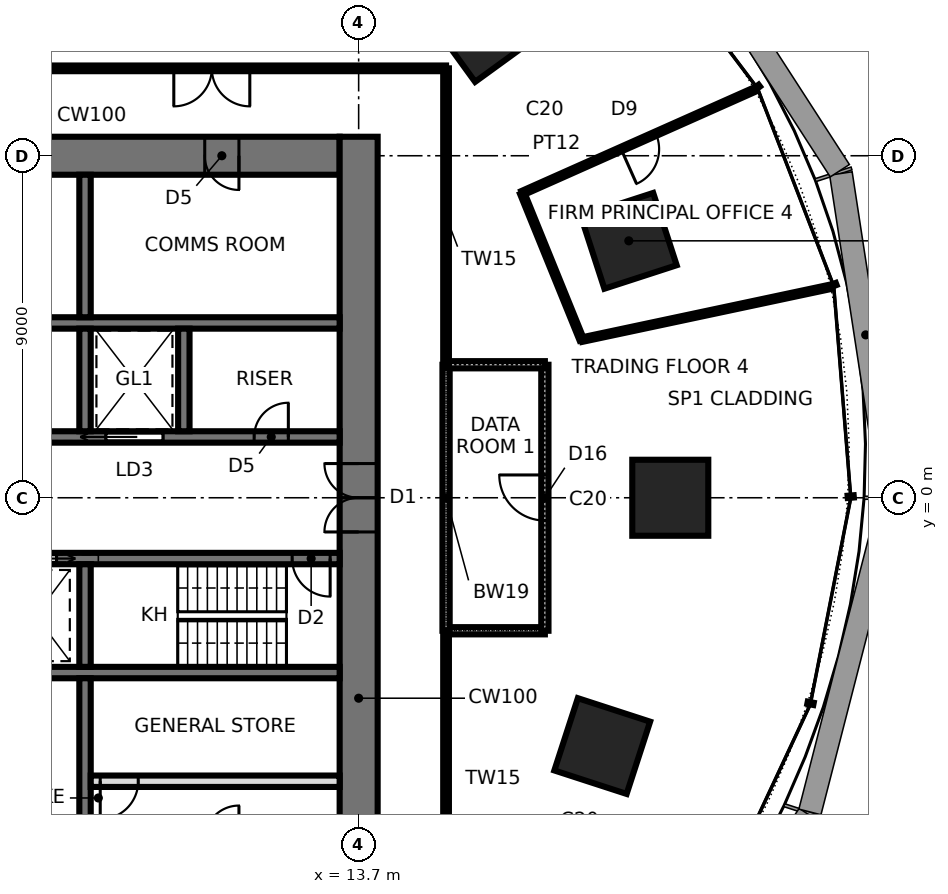
"""IFC4 building model, lengths in metres.
Left out: names, types, materials, properties, quantities, classifications, styles, units other than length and angle.
Written with IfcOpenShell. Run it as: python <this file> out.ifc"""

import sys

from ifc_helpers import new_model, si_unit, direction, frame, frame_2d, origin, origin_2d, place, context, subcontext, project, spatial, rectangle, extrude, element, fill, save


model = new_model("IFC4")
c1 = context("Model", 3, precision=1e-05, world=origin(), true_north=direction((0.0, 1.0)))
c2 = subcontext(c1, "Body", "Model", "MODEL_VIEW")
j1 = project(units=[si_unit("LENGTHUNIT", "METRE"), si_unit("PLANEANGLEUNIT", "RADIAN")], contexts=[c1])
p1 = place(None, origin())
s1 = spatial("IfcSite", under=j1, at=p1, CompositionType="ELEMENT")
p2 = place(p1, origin())
s2 = spatial("IfcBuilding", under=s1, at=p2, CompositionType="ELEMENT")
p3 = place(p2, frame((0.0, 0.0, 65.8)))
s3 = spatial("IfcBuildingStorey", under=s2, at=p3, CompositionType="ELEMENT", Elevation=65.8)
for number, where, z_axis, x_axis in (
    (1, (21.9, 0.0, 0.0), (0.0, 0.0, 1.0), (1.0, 0.0, 0.0)),
    (2, (20.808, 6.761, 0.0), (0.0, 0.0, 1.0), (0.951, 0.309, 0.0)),
    (3, (16.986, 12.341, 0.0), (0.0, 0.0, 1.0), (0.809, 0.588, 0.0)),
    (4, (20.109, -6.534, 0.0), (0.0, 0.0, 1.0), (0.951, -0.309, 0.0)),
):
    element("IfcColumn", number, at=place(p3, frame(where, z_axis=z_axis, x_axis=x_axis)), inside=s3, PredefinedType="COLUMN", context=c2, shape_type="SweptSolid", body=[
        extrude(rectangle(XDim=2.0, YDim=2.0, at=origin_2d()), origin(), (0.0, 0.0, 1.0), 4.2),
    ])
p4 = place(p3, frame((13.2, 9.0, 0.0), z_axis=(0.0, 0.0, 1.0), x_axis=(-1.0, 0.0, 0.0)))
e5 = element("IfcWall", 5, at=p4, inside=s3, PredefinedType="SHEAR", context=c2, shape_type="SweptSolid", body=[
    extrude(rectangle(XDim=26.4, YDim=1.0, at=frame_2d((13.2, 0.0))), origin(), (0.0, 0.0, 1.0), 4.2),
])
p5 = place(p4, frame((2.65, 0.0, 0.0)))
e6 = element("IfcOpeningElement", 6, at=p5, cuts=e5, PredefinedType="OPENING", context=c2, shape_type="SweptSolid", body=[
    extrude(rectangle(XDim=0.9, YDim=2.1, at=frame_2d((0.45, 1.05))), frame((0.0, 0.51, 0.0), z_axis=(0.0, -1.0, 0.0), x_axis=(1.0, 0.0, 0.0)), (0.0, 0.0, 1.0), 1.02),
])
p6 = place(p4, frame((9.5, 0.0, 0.0)))
e7 = element("IfcOpeningElement", 7, at=p6, cuts=e5, PredefinedType="OPENING", context=c2, shape_type="SweptSolid", body=[
    extrude(rectangle(XDim=0.9, YDim=2.1, at=frame_2d((0.45, 1.05))), frame((0.0, 0.51, 0.0), z_axis=(0.0, -1.0, 0.0), x_axis=(1.0, 0.0, 0.0)), (0.0, 0.0, 1.0), 1.02),
])
p7 = place(p4, frame((16.0, 0.0, 0.0)))
e8 = element("IfcOpeningElement", 8, at=p7, cuts=e5, PredefinedType="OPENING", context=c2, shape_type="SweptSolid", body=[
    extrude(rectangle(XDim=0.9, YDim=2.1, at=frame_2d((0.45, 1.05))), frame((0.0, 0.51, 0.0), z_axis=(0.0, -1.0, 0.0), x_axis=(1.0, 0.0, 0.0)), (0.0, 0.0, 1.0), 1.02),
])
p8 = place(p4, frame((21.25, 0.0, 0.0)))
e9 = element("IfcOpeningElement", 9, at=p8, cuts=e5, PredefinedType="OPENING", context=c2, shape_type="SweptSolid", body=[
    extrude(rectangle(XDim=0.9, YDim=2.1, at=frame_2d((0.45, 1.05))), frame((0.0, 0.51, 0.0), z_axis=(0.0, -1.0, 0.0), x_axis=(1.0, 0.0, 0.0)), (0.0, 0.0, 1.0), 1.02),
])
p9 = place(p4, frame((24.8, 0.0, 0.0)))
e10 = element("IfcOpeningElement", 10, at=p9, cuts=e5, PredefinedType="OPENING", context=c2, shape_type="SweptSolid", body=[
    extrude(rectangle(XDim=1.0, YDim=2.1, at=frame_2d((0.5, 1.05))), frame((0.0, 0.51, 0.0), z_axis=(0.0, -1.0, 0.0), x_axis=(1.0, 0.0, 0.0)), (0.0, 0.0, 1.0), 1.02),
])
p10 = place(p3, frame((13.7, -9.5, 0.0), z_axis=(0.0, 0.0, 1.0), x_axis=(0.0, 1.0, 0.0)))
e11 = element("IfcWall", 11, at=p10, inside=s3, PredefinedType="SHEAR", context=c2, shape_type="SweptSolid", body=[
    extrude(rectangle(XDim=19.0, YDim=1.0, at=frame_2d((9.5, 0.0))), origin(), (0.0, 0.0, 1.0), 4.2),
])
p11 = place(p10, frame((8.6, 0.0, 0.0)))
e12 = element("IfcOpeningElement", 12, at=p11, cuts=e11, PredefinedType="OPENING", context=c2, shape_type="SweptSolid", body=[
    extrude(rectangle(XDim=1.8, YDim=2.4, at=frame_2d((0.9, 1.2))), frame((0.0, 0.51, 0.0), z_axis=(0.0, -1.0, 0.0), x_axis=(1.0, 0.0, 0.0)), (0.0, 0.0, 1.0), 1.02),
])
p12 = place(p3, frame((-13.2, 1.6, 0.0), z_axis=(0.0, 0.0, 1.0), x_axis=(1.0, 0.0, 0.0)))
e13 = element("IfcWall", 13, at=p12, inside=s3, PredefinedType="SHEAR", context=c2, shape_type="SweptSolid", body=[
    extrude(rectangle(XDim=26.4, YDim=0.3, at=frame_2d((13.2, 0.0))), origin(), (0.0, 0.0, 1.0), 4.2),
])
p13 = place(p12, frame((0.25, 0.0, 0.0)))
e14 = element("IfcOpeningElement", 14, at=p13, cuts=e13, PredefinedType="OPENING", context=c2, shape_type="SweptSolid", body=[
    extrude(rectangle(XDim=1.0, YDim=2.1, at=frame_2d((0.5, 1.05))), frame((0.0, 0.16, 0.0), z_axis=(0.0, -1.0, 0.0), x_axis=(1.0, 0.0, 0.0)), (0.0, 0.0, 1.0), 0.32),
])
p14 = place(p12, frame((20.25, 0.0, 0.0)))
e15 = element("IfcOpeningElement", 15, at=p14, cuts=e13, PredefinedType="OPENING", context=c2, shape_type="SweptSolid", body=[
    extrude(rectangle(XDim=1.5, YDim=2.4, at=frame_2d((0.75, 1.2))), frame((0.0, 0.16, 0.0), z_axis=(0.0, -1.0, 0.0), x_axis=(1.0, 0.0, 0.0)), (0.0, 0.0, 1.0), 0.32),
])
p15 = place(p12, frame((7.45, 0.0, 0.0)))
e16 = element("IfcOpeningElement", 16, at=p15, cuts=e13, PredefinedType="OPENING", context=c2, shape_type="SweptSolid", body=[
    extrude(rectangle(XDim=1.1, YDim=2.3, at=frame_2d((0.55, 1.15))), frame((0.0, 0.16, 0.0), z_axis=(0.0, -1.0, 0.0), x_axis=(1.0, 0.0, 0.0)), (0.0, 0.0, 1.0), 0.32),
])
p16 = place(p12, frame((10.05, 0.0, 0.0)))
e17 = element("IfcOpeningElement", 17, at=p16, cuts=e13, PredefinedType="OPENING", context=c2, shape_type="SweptSolid", body=[
    extrude(rectangle(XDim=1.1, YDim=2.3, at=frame_2d((0.55, 1.15))), frame((0.0, 0.16, 0.0), z_axis=(0.0, -1.0, 0.0), x_axis=(1.0, 0.0, 0.0)), (0.0, 0.0, 1.0), 0.32),
])
p17 = place(p12, frame((12.65, 0.0, 0.0)))
e18 = element("IfcOpeningElement", 18, at=p17, cuts=e13, PredefinedType="OPENING", context=c2, shape_type="SweptSolid", body=[
    extrude(rectangle(XDim=1.1, YDim=2.3, at=frame_2d((0.55, 1.15))), frame((0.0, 0.16, 0.0), z_axis=(0.0, -1.0, 0.0), x_axis=(1.0, 0.0, 0.0)), (0.0, 0.0, 1.0), 0.32),
])
p18 = place(p12, frame((24.15, 0.0, 0.0)))
e19 = element("IfcOpeningElement", 19, at=p18, cuts=e13, PredefinedType="OPENING", context=c2, shape_type="SweptSolid", body=[
    extrude(rectangle(XDim=0.9, YDim=2.1, at=frame_2d((0.45, 1.05))), frame((0.0, 0.16, 0.0), z_axis=(0.0, -1.0, 0.0), x_axis=(1.0, 0.0, 0.0)), (0.0, 0.0, 1.0), 0.32),
])
p19 = place(p3, frame((-13.2, -1.6, 0.0), z_axis=(0.0, 0.0, 1.0), x_axis=(1.0, 0.0, 0.0)))
e20 = element("IfcWall", 20, at=p19, inside=s3, PredefinedType="SHEAR", context=c2, shape_type="SweptSolid", body=[
    extrude(rectangle(XDim=26.4, YDim=0.3, at=frame_2d((13.2, 0.0))), origin(), (0.0, 0.0, 1.0), 4.2),
])
p20 = place(p19, frame((25.15, 0.0, 0.0)))
e21 = element("IfcOpeningElement", 21, at=p20, cuts=e20, PredefinedType="OPENING", context=c2, shape_type="SweptSolid", body=[
    extrude(rectangle(XDim=1.0, YDim=2.1, at=frame_2d((0.5, 1.05))), frame((0.0, 0.16, 0.0), z_axis=(0.0, -1.0, 0.0), x_axis=(1.0, 0.0, 0.0)), (0.0, 0.0, 1.0), 0.32),
])
p21 = place(p19, frame((15.25, 0.0, 0.0)))
e22 = element("IfcOpeningElement", 22, at=p21, cuts=e20, PredefinedType="OPENING", context=c2, shape_type="SweptSolid", body=[
    extrude(rectangle(XDim=1.1, YDim=2.3, at=frame_2d((0.55, 1.15))), frame((0.0, 0.16, 0.0), z_axis=(0.0, -1.0, 0.0), x_axis=(1.0, 0.0, 0.0)), (0.0, 0.0, 1.0), 0.32),
])
p22 = place(p19, frame((17.85, 0.0, 0.0)))
e23 = element("IfcOpeningElement", 23, at=p22, cuts=e20, PredefinedType="OPENING", context=c2, shape_type="SweptSolid", body=[
    extrude(rectangle(XDim=1.1, YDim=2.3, at=frame_2d((0.55, 1.15))), frame((0.0, 0.16, 0.0), z_axis=(0.0, -1.0, 0.0), x_axis=(1.0, 0.0, 0.0)), (0.0, 0.0, 1.0), 0.32),
])
p23 = place(p19, frame((5.55, 0.0, 0.0)))
e24 = element("IfcOpeningElement", 24, at=p23, cuts=e20, PredefinedType="OPENING", context=c2, shape_type="SweptSolid", body=[
    extrude(rectangle(XDim=0.9, YDim=2.1, at=frame_2d((0.45, 1.05))), frame((0.0, 0.16, 0.0), z_axis=(0.0, -1.0, 0.0), x_axis=(1.0, 0.0, 0.0)), (0.0, 0.0, 1.0), 0.32),
])
for number, where, z_axis, x_axis in (
    (25, (-13.2, 4.6, 0.0), (0.0, 0.0, 1.0), (1.0, 0.0, 0.0)),
    (26, (-13.2, -4.6, 0.0), (0.0, 0.0, 1.0), (1.0, 0.0, 0.0)),
):
    element("IfcWall", number, at=place(p3, frame(where, z_axis=z_axis, x_axis=x_axis)), inside=s3, PredefinedType="SHEAR", context=c2, shape_type="SweptSolid", body=[
        extrude(rectangle(XDim=26.4, YDim=0.3, at=frame_2d((13.2, 0.0))), origin(), (0.0, 0.0, 1.0), 4.2),
    ])
p24 = place(p3, frame((6.5, 1.75, 0.0), z_axis=(0.0, 0.0, 1.0), x_axis=(0.0, 1.0, 0.0)))
e27 = element("IfcWall", 27, at=p24, inside=s3, PredefinedType="SHEAR", context=c2, shape_type="SweptSolid", body=[
    extrude(rectangle(XDim=2.7, YDim=0.3, at=frame_2d((1.35, 0.0))), origin(), (0.0, 0.0, 1.0), 4.2),
])
p25 = place(p3, frame((6.5, 4.75, 0.0), z_axis=(0.0, 0.0, 1.0), x_axis=(0.0, 1.0, 0.0)))
e28 = element("IfcWall", 28, at=p25, inside=s3, PredefinedType="SHEAR", context=c2, shape_type="SweptSolid", body=[
    extrude(rectangle(XDim=3.75, YDim=0.3, at=frame_2d((1.875, 0.0))), origin(), (0.0, 0.0, 1.0), 4.2),
])
p26 = place(p3, frame((6.5, -1.75, 0.0), z_axis=(0.0, 0.0, 1.0), x_axis=(0.0, -1.0, 0.0)))
e29 = element("IfcWall", 29, at=p26, inside=s3, PredefinedType="SHEAR", context=c2, shape_type="SweptSolid", body=[
    extrude(rectangle(XDim=2.7, YDim=0.3, at=frame_2d((1.35, 0.0))), origin(), (0.0, 0.0, 1.0), 4.2),
])
p27 = place(p3, frame((6.5, -4.75, 0.0), z_axis=(0.0, 0.0, 1.0), x_axis=(0.0, -1.0, 0.0)))
e30 = element("IfcWall", 30, at=p27, inside=s3, PredefinedType="SHEAR", context=c2, shape_type="SweptSolid", body=[
    extrude(rectangle(XDim=3.75, YDim=0.3, at=frame_2d((1.875, 0.0))), origin(), (0.0, 0.0, 1.0), 4.2),
])
p28 = place(p3, frame((9.1, 1.75, 0.0), z_axis=(0.0, 0.0, 1.0), x_axis=(0.0, 1.0, 0.0)))
e31 = element("IfcWall", 31, at=p28, inside=s3, PredefinedType="SHEAR", context=c2, shape_type="SweptSolid", body=[
    extrude(rectangle(XDim=2.7, YDim=0.3, at=frame_2d((1.35, 0.0))), origin(), (0.0, 0.0, 1.0), 4.2),
])
p29 = place(p3, frame((6.65, -7.46, 0.0), z_axis=(0.0, 0.0, 1.0), x_axis=(1.0, 0.0, 0.0)))
e32 = element("IfcWall", 32, at=p29, inside=s3, PredefinedType="PARTITIONING", context=c2, shape_type="SweptSolid", body=[
    extrude(rectangle(XDim=6.55, YDim=0.3, at=frame_2d((3.275, 0.0))), origin(), (0.0, 0.0, 1.0), 4.04),
])
p30 = place(p29, frame((0.25, 0.0, 0.0)))
e33 = element("IfcOpeningElement", 33, at=p30, cuts=e32, PredefinedType="OPENING", context=c2, shape_type="SweptSolid", body=[
    extrude(rectangle(XDim=1.0, YDim=2.4, at=frame_2d((0.5, 1.2))), frame((0.0, 0.16, 0.0), z_axis=(0.0, -1.0, 0.0), x_axis=(1.0, 0.0, 0.0)), (0.0, 0.0, 1.0), 0.32),
])
p31 = place(p3, frame((16.0, -11.3, 0.0), z_axis=(0.0, 0.0, 1.0), x_axis=(0.0, 1.0, 0.0)))
e34 = element("IfcWall", 34, at=p31, inside=s3, PredefinedType="PARTITIONING", context=c2, shape_type="SweptSolid", body=[
    extrude(rectangle(XDim=7.8, YDim=0.15, at=frame_2d((3.9, 0.0))), origin(), (0.0, 0.0, 1.0), 4.04),
])
p32 = place(p3, frame((16.0, -3.5, 0.0), z_axis=(0.0, 0.0, 1.0), x_axis=(1.0, 0.0, 0.0)))
e35 = element("IfcWall", 35, at=p32, inside=s3, PredefinedType="SOLIDWALL", context=c2, shape_type="SweptSolid", body=[
    extrude(rectangle(XDim=2.6, YDim=0.19, at=frame_2d((1.3, 0.0))), origin(), (0.0, 0.0, 1.0), 4.04),
])
p33 = place(p3, frame((16.0, 3.5, 0.0), z_axis=(0.0, 0.0, 1.0), x_axis=(0.0, -1.0, 0.0)))
e36 = element("IfcWall", 36, at=p33, inside=s3, PredefinedType="SOLIDWALL", context=c2, shape_type="SweptSolid", body=[
    extrude(rectangle(XDim=7.0, YDim=0.19, at=frame_2d((3.5, 0.0))), origin(), (0.0, 0.0, 1.0), 4.04),
])
p34 = place(p3, frame((18.6, -3.5, 0.0), z_axis=(0.0, 0.0, 1.0), x_axis=(0.0, 1.0, 0.0)))
e37 = element("IfcWall", 37, at=p34, inside=s3, PredefinedType="SOLIDWALL", context=c2, shape_type="SweptSolid", body=[
    extrude(rectangle(XDim=7.0, YDim=0.19, at=frame_2d((3.5, 0.0))), origin(), (0.0, 0.0, 1.0), 3.586),
])
p35 = place(p34, frame((2.9, 0.0, 0.0)))
e38 = element("IfcOpeningElement", 38, at=p35, cuts=e37, PredefinedType="OPENING", context=c2, shape_type="SweptSolid", body=[
    extrude(rectangle(XDim=1.2, YDim=2.1, at=frame_2d((0.6, 1.05))), frame((0.0, 0.105, 0.0), z_axis=(0.0, -1.0, 0.0), x_axis=(1.0, 0.0, 0.0)), (0.0, 0.0, 1.0), 0.21),
])
p36 = place(p3, frame((18.6, 3.5, 0.0), z_axis=(0.0, 0.0, 1.0), x_axis=(-1.0, 0.0, 0.0)))
e39 = element("IfcWall", 39, at=p36, inside=s3, PredefinedType="SOLIDWALL", context=c2, shape_type="SweptSolid", body=[
    extrude(rectangle(XDim=2.6, YDim=0.19, at=frame_2d((1.3, 0.0))), origin(), (0.0, 0.0, 1.0), 4.04),
])
p37 = place(p3, frame((19.57, 4.16, 0.0), z_axis=(0.0, 0.0, 1.0), x_axis=(0.978146625084, 0.207916280835, 0.0)))
e40 = element("IfcWall", 40, at=p37, inside=s3, PredefinedType="PARTITIONING", context=c2, shape_type="SweptSolid", body=[
    extrude(rectangle(XDim=6.7, YDim=0.12, at=frame_2d((3.35, 0.0))), origin(), (0.0, 0.0, 1.0), 4.04),
])
p38 = place(p3, frame((18.003, 8.015, 0.0), z_axis=(0.0, 0.0, 1.0), x_axis=(0.376482466065, -0.926423743622, 0.0)))
e41 = element("IfcWall", 41, at=p38, inside=s3, PredefinedType="PARTITIONING", context=c2, shape_type="SweptSolid", body=[
    extrude(rectangle(XDim=4.162, YDim=0.12, at=frame_2d((2.081, 0.0))), origin(), (0.0, 0.0, 1.0), 4.04),
])
p39 = place(p3, frame((24.124, 10.74, 0.0), z_axis=(0.0, 0.0, 1.0), x_axis=(-0.91354990356, -0.406726657235, 0.0)))
e42 = element("IfcWall", 42, at=p39, inside=s3, PredefinedType="PARTITIONING", context=c2, shape_type="SweptSolid", body=[
    extrude(rectangle(XDim=6.7, YDim=0.12, at=frame_2d((3.35, 0.0))), origin(), (0.0, 0.0, 1.0), 4.04),
])
p40 = place(p39, frame((2.85, 0.0, 0.0)))
e43 = element("IfcOpeningElement", 43, at=p40, cuts=e42, PredefinedType="OPENING", context=c2, shape_type="SweptSolid", body=[
    extrude(rectangle(XDim=1.0, YDim=2.4, at=frame_2d((0.5, 1.2))), frame((0.0, 0.07, 0.0), z_axis=(0.0, -1.0, 0.0), x_axis=(1.0, 0.0, 0.0)), (0.0, 0.0, 1.0), 0.14),
])
p41 = place(p3, frame((16.0, 3.5, 0.0), z_axis=(0.0, 0.0, 1.0), x_axis=(0.0, 1.0, 0.0)))
e44 = element("IfcWall", 44, at=p41, inside=s3, PredefinedType="PARTITIONING", context=c2, shape_type="SweptSolid", body=[
    extrude(rectangle(XDim=7.8, YDim=0.15, at=frame_2d((3.9, 0.0))), origin(), (0.0, 0.0, 1.0), 4.04),
])
p42 = place(p3, frame((16.0, 11.3, 0.0), z_axis=(0.0, 0.0, 1.0), x_axis=(-1.0, 0.0, 0.0)))
e45 = element("IfcWall", 45, at=p42, inside=s3, PredefinedType="PARTITIONING", context=c2, shape_type="SweptSolid", body=[
    extrude(rectangle(XDim=13.0, YDim=0.15, at=frame_2d((6.5, 0.0))), origin(), (0.0, 0.0, 1.0), 4.04),
])
p43 = place(p42, frame((5.164, 0.0, 0.0)))
e46 = element("IfcOpeningElement", 46, at=p43, cuts=e45, PredefinedType="OPENING", context=c2, shape_type="SweptSolid", body=[
    extrude(rectangle(XDim=2.0, YDim=2.4, at=frame_2d((1.0, 1.2))), frame((0.0, 0.085, 0.0), z_axis=(0.0, -1.0, 0.0), x_axis=(1.0, 0.0, 0.0)), (0.0, 0.0, 1.0), 0.17),
])
p44 = place(p3, frame((7.157, 22.026, 0.0), z_axis=(0.0, 0.0, 1.0), x_axis=(-0.309010203018, -0.951058722914, 0.0)))
e47 = element("IfcWall", 47, at=p44, inside=s3, PredefinedType="PARTITIONING", context=c2, shape_type="SweptSolid", body=[
    extrude(rectangle(XDim=11.278, YDim=0.15, at=frame_2d((5.639, 0.0))), origin(), (0.0, 0.0, 1.0), 2.84),
])
p45 = place(p11, origin())
e48 = element("IfcDoor", 48, at=p45, inside=s3, OperationType="DOUBLE_DOOR_SINGLE_SWING", PredefinedType="DOOR", context=c2, shape_type="SweptSolid", body=[
    extrude(rectangle(XDim=1.72, YDim=2.36, at=frame_2d((0.9, 1.18))), frame((0.0, 0.025, 0.0), z_axis=(0.0, -1.0, 0.0), x_axis=(1.0, 0.0, 0.0)), (0.0, 0.0, 1.0), 0.05),
    extrude(rectangle(XDim=0.04, YDim=2.4, at=frame_2d((0.02, 1.2))), frame((0.0, 0.25, 0.0), z_axis=(0.0, -1.0, 0.0), x_axis=(1.0, 0.0, 0.0)), (0.0, 0.0, 1.0), 0.5),
    extrude(rectangle(XDim=0.04, YDim=2.4, at=frame_2d((1.78, 1.2))), frame((0.0, 0.25, 0.0), z_axis=(0.0, -1.0, 0.0), x_axis=(1.0, 0.0, 0.0)), (0.0, 0.0, 1.0), 0.5),
    extrude(rectangle(XDim=1.72, YDim=0.04, at=frame_2d((0.9, 2.38))), frame((0.0, 0.25, 0.0), z_axis=(0.0, -1.0, 0.0), x_axis=(1.0, 0.0, 0.0)), (0.0, 0.0, 1.0), 0.5),
])
fill(e12, e48)
p46 = place(p20, frame((1.0, 0.0, 0.0), z_axis=(0.0, 0.0, 1.0), x_axis=(-1.0, 0.0, 0.0)))
e49 = element("IfcDoor", 49, at=p46, inside=s3, OperationType="SINGLE_SWING_LEFT", PredefinedType="DOOR", context=c2, shape_type="SweptSolid", body=[
    extrude(rectangle(XDim=1.0, YDim=2.1, at=frame_2d((0.5, 1.05))), frame((0.0, 0.025, 0.0), z_axis=(0.0, -1.0, 0.0), x_axis=(1.0, 0.0, 0.0)), (0.0, 0.0, 1.0), 0.05),
])
fill(e21, e49)
p47 = place(p14, origin())
e50 = element("IfcDoor", 50, at=p47, inside=s3, OperationType="SLIDING_TO_LEFT", PredefinedType="DOOR", context=c2, shape_type="SweptSolid", body=[
    extrude(rectangle(XDim=1.5, YDim=2.4, at=frame_2d((0.75, 1.2))), frame((0.0, 0.025, 0.0), z_axis=(0.0, -1.0, 0.0), x_axis=(1.0, 0.0, 0.0)), (0.0, 0.0, 1.0), 0.05),
])
fill(e15, e50)
p48 = place(p22, frame((1.1, 0.0, 0.0), z_axis=(0.0, 0.0, 1.0), x_axis=(-1.0, 0.0, 0.0)))
e51 = element("IfcDoor", 51, at=p48, inside=s3, OperationType="SLIDING_TO_LEFT", PredefinedType="DOOR", context=c2, shape_type="SweptSolid", body=[
    extrude(rectangle(XDim=1.1, YDim=2.3, at=frame_2d((0.55, 1.15))), frame((0.0, 0.025, 0.0), z_axis=(0.0, -1.0, 0.0), x_axis=(1.0, 0.0, 0.0)), (0.0, 0.0, 1.0), 0.05),
])
fill(e23, e51)
p49 = place(p18, origin())
e52 = element("IfcDoor", 52, at=p49, inside=s3, OperationType="SINGLE_SWING_RIGHT", PredefinedType="DOOR", context=c2, shape_type="SweptSolid", body=[
    extrude(rectangle(XDim=0.9, YDim=2.1, at=frame_2d((0.45, 1.05))), frame((0.0, 0.025, 0.0), z_axis=(0.0, -1.0, 0.0), x_axis=(1.0, 0.0, 0.0)), (0.0, 0.0, 1.0), 0.05),
])
fill(e19, e52)
p50 = place(p5, origin())
e53 = element("IfcDoor", 53, at=p50, inside=s3, OperationType="SINGLE_SWING_LEFT", PredefinedType="DOOR", context=c2, shape_type="SweptSolid", body=[
    extrude(rectangle(XDim=0.82, YDim=2.06, at=frame_2d((0.45, 1.03))), frame((0.0, 0.025, 0.0), z_axis=(0.0, -1.0, 0.0), x_axis=(1.0, 0.0, 0.0)), (0.0, 0.0, 1.0), 0.05),
    extrude(rectangle(XDim=0.04, YDim=2.1, at=frame_2d((0.02, 1.05))), frame((0.0, 0.25, 0.0), z_axis=(0.0, -1.0, 0.0), x_axis=(1.0, 0.0, 0.0)), (0.0, 0.0, 1.0), 0.5),
    extrude(rectangle(XDim=0.04, YDim=2.1, at=frame_2d((0.88, 1.05))), frame((0.0, 0.25, 0.0), z_axis=(0.0, -1.0, 0.0), x_axis=(1.0, 0.0, 0.0)), (0.0, 0.0, 1.0), 0.5),
    extrude(rectangle(XDim=0.82, YDim=0.04, at=frame_2d((0.45, 2.08))), frame((0.0, 0.25, 0.0), z_axis=(0.0, -1.0, 0.0), x_axis=(1.0, 0.0, 0.0)), (0.0, 0.0, 1.0), 0.5),
])
fill(e6, e53)
p51 = place(p30, frame((1.0, 0.0, 0.0), z_axis=(0.0, 0.0, 1.0), x_axis=(-1.0, 0.0, 0.0)))
e54 = element("IfcDoor", 54, at=p51, inside=s3, OperationType="SINGLE_SWING_RIGHT", PredefinedType="DOOR", context=c2, shape_type="SweptSolid", body=[
    extrude(rectangle(XDim=1.0, YDim=2.4, at=frame_2d((0.5, 1.2))), frame((0.0, 0.025, 0.0), z_axis=(0.0, -1.0, 0.0), x_axis=(1.0, 0.0, 0.0)), (0.0, 0.0, 1.0), 0.05),
])
fill(e33, e54)
p52 = place(p40, origin())
e55 = element("IfcDoor", 55, at=p52, inside=s3, OperationType="SINGLE_SWING_RIGHT", PredefinedType="DOOR", context=c2, shape_type="SweptSolid", body=[
    extrude(rectangle(XDim=1.0, YDim=2.4, at=frame_2d((0.5, 1.2))), frame((0.0, 0.025, 0.0), z_axis=(0.0, -1.0, 0.0), x_axis=(1.0, 0.0, 0.0)), (0.0, 0.0, 1.0), 0.05),
])
fill(e43, e55)
p53 = place(p35, origin())
e56 = element("IfcDoor", 56, at=p53, inside=s3, OperationType="SINGLE_SWING_RIGHT", PredefinedType="DOOR", context=c2, shape_type="SweptSolid", body=[
    extrude(rectangle(XDim=1.2, YDim=2.1, at=frame_2d((0.6, 1.05))), frame((0.0, 0.025, 0.0), z_axis=(0.0, -1.0, 0.0), x_axis=(1.0, 0.0, 0.0)), (0.0, 0.0, 1.0), 0.05),
])
fill(e38, e56)
p54 = place(p43, origin())
e57 = element("IfcDoor", 57, at=p54, inside=s3, OperationType="DOUBLE_DOOR_SINGLE_SWING", PredefinedType="DOOR", context=c2, shape_type="SweptSolid", body=[
    extrude(rectangle(XDim=2.0, YDim=2.4, at=frame_2d((1.0, 1.2))), frame((0.0, 0.025, 0.0), z_axis=(0.0, -1.0, 0.0), x_axis=(1.0, 0.0, 0.0)), (0.0, 0.0, 1.0), 0.05),
])
fill(e46, e57)
save(model, sys.argv[1])
